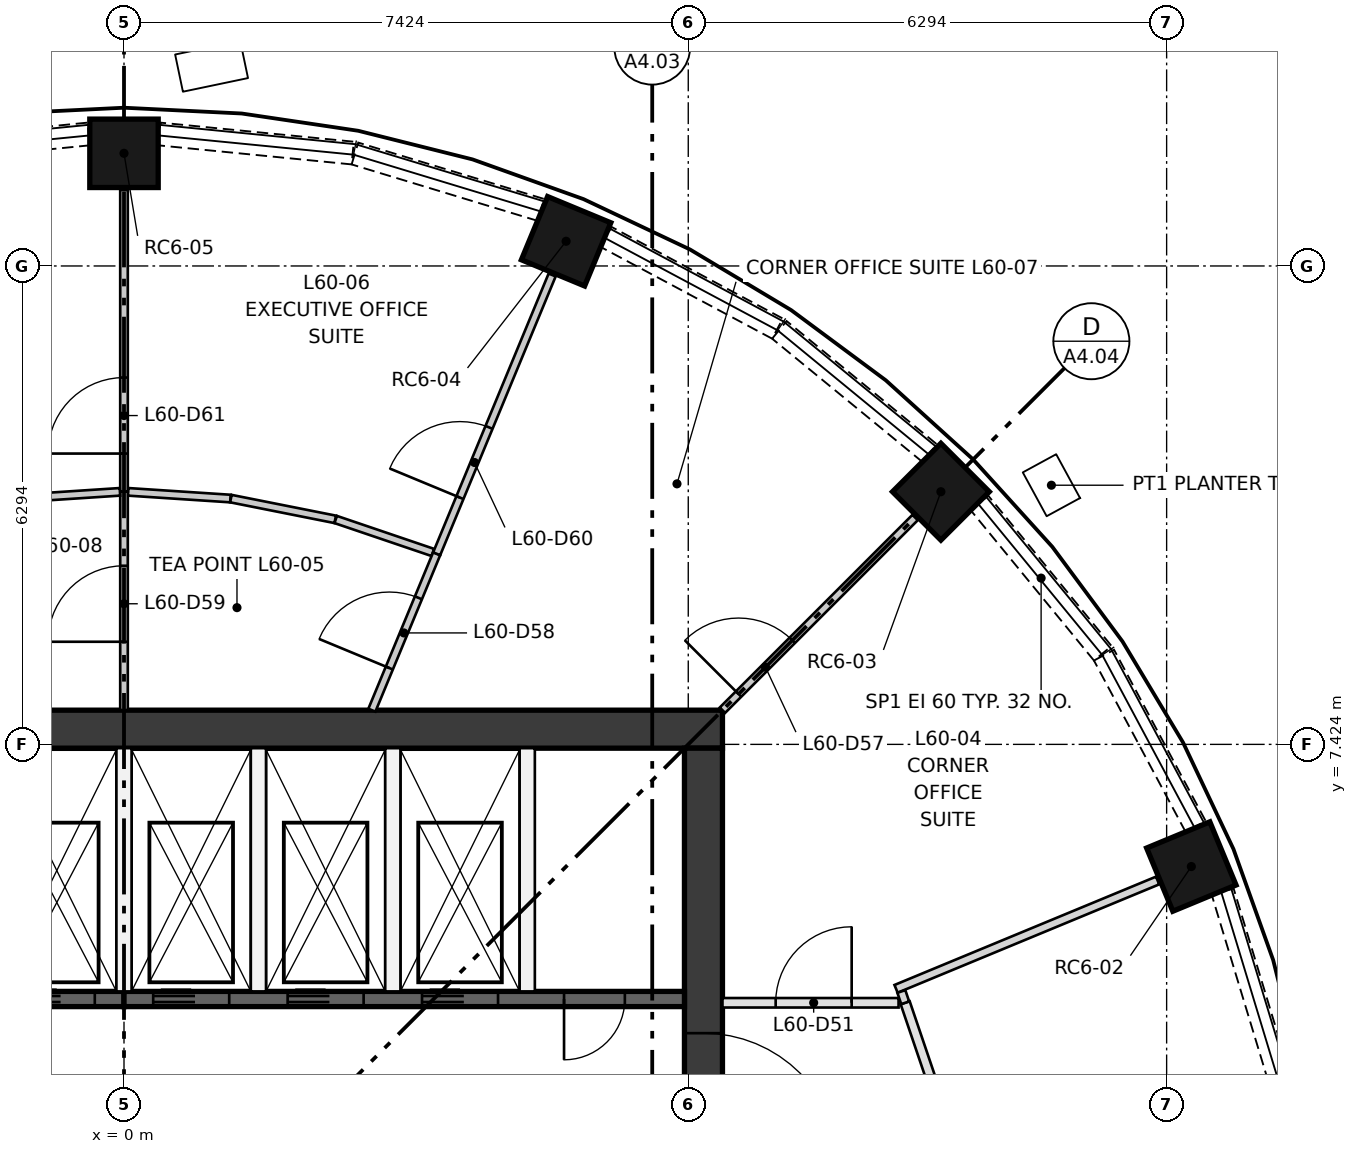
"""IFC4 building model, lengths in metres.
Left out: names, types, materials, properties, quantities, classifications, styles, units other than length and angle.
Written with IfcOpenShell. Run it as: python <this file> out.ifc"""

import sys

from ifc_helpers import new_model, si_unit, direction, frame, frame_2d, origin, origin_2d, place, context, subcontext, project, spatial, rectangle, extrude, element, fill, save


model = new_model("IFC4")
c1 = context("Model", 3, precision=1e-05, world=origin(), true_north=direction((0.0, 1.0)))
c2 = subcontext(c1, "Body", "Model", "MODEL_VIEW")
j1 = project(units=[si_unit("LENGTHUNIT", "METRE"), si_unit("PLANEANGLEUNIT", "RADIAN")], contexts=[c1])
p1 = place(None, origin())
s1 = spatial("IfcSite", under=j1, at=p1, CompositionType="ELEMENT")
p2 = place(p1, origin())
s2 = spatial("IfcBuilding", under=s1, at=p2, CompositionType="ELEMENT")
p3 = place(p2, frame((0.0, 0.0, 221.15)))
s3 = spatial("IfcBuildingStorey", under=s2, at=p3, CompositionType="ELEMENT", Elevation=221.15)
for number, where, z_axis, x_axis in (
    (1, (14.043, 5.817, 0.0), (0.0, 0.0, 1.0), (0.924, 0.383, 0.0)),
    (2, (10.748, 10.748, 0.0), (0.0, 0.0, 1.0), (0.707, 0.707, 0.0)),
    (3, (5.817, 14.043, 0.0), (0.0, 0.0, 1.0), (0.383, 0.924, 0.0)),
    (4, (0.0, 15.2, 0.0), (0.0, 0.0, 1.0), (0.0, 1.0, 0.0)),
):
    element("IfcColumn", number, at=place(p3, frame(where, z_axis=z_axis, x_axis=x_axis)), inside=s3, PredefinedType="COLUMN", context=c2, shape_type="SweptSolid", body=[
        extrude(rectangle(XDim=0.9, YDim=0.9, at=origin_2d()), origin(), (0.0, 0.0, 1.0), 2.85),
    ])
p4 = place(p3, frame((-7.874, 7.624, 0.0), z_axis=(0.0, 0.0, 1.0), x_axis=(1.0, 0.0, 0.0)))
e5 = element("IfcWall", 5, at=p4, inside=s3, PredefinedType="SHEAR", context=c2, shape_type="SweptSolid", body=[
    extrude(rectangle(XDim=15.748, YDim=0.5, at=frame_2d((7.874, 0.0))), origin(), (0.0, 0.0, 1.0), 3.35),
])
p5 = place(p3, frame((7.624, -7.374, 0.0), z_axis=(0.0, 0.0, 1.0), x_axis=(0.0, 1.0, 0.0)))
e6 = element("IfcWall", 6, at=p5, inside=s3, PredefinedType="SHEAR", context=c2, shape_type="SweptSolid", body=[
    extrude(rectangle(XDim=14.748, YDim=0.5, at=frame_2d((7.374, 0.0))), origin(), (0.0, 0.0, 1.0), 3.35),
])
p6 = place(p5, frame((6.874, 0.0, 0.0)))
e7 = element("IfcOpeningElement", 7, at=p6, cuts=e6, PredefinedType="OPENING", context=c2, shape_type="SweptSolid", body=[
    extrude(rectangle(XDim=1.0, YDim=2.1, at=frame_2d((0.5, 1.05))), frame((0.0, 0.26, 0.0), z_axis=(0.0, -1.0, 0.0), x_axis=(1.0, 0.0, 0.0)), (0.0, 0.0, 1.0), 0.52),
])
p7 = place(p5, frame((3.75, 0.0, 0.0)))
e8 = element("IfcOpeningElement", 8, at=p7, cuts=e6, PredefinedType="OPENING", context=c2, shape_type="SweptSolid", body=[
    extrude(rectangle(XDim=1.8, YDim=2.1, at=frame_2d((0.9, 1.05))), frame((0.0, 0.26, 0.0), z_axis=(0.0, -1.0, 0.0), x_axis=(1.0, 0.0, 0.0)), (0.0, 0.0, 1.0), 0.52),
])
p8 = place(p5, frame((9.198, 0.0, 0.0)))
e9 = element("IfcOpeningElement", 9, at=p8, cuts=e6, PredefinedType="OPENING", context=c2, shape_type="SweptSolid", body=[
    extrude(rectangle(XDim=1.8, YDim=2.1, at=frame_2d((0.9, 1.05))), frame((0.0, 0.26, 0.0), z_axis=(0.0, -1.0, 0.0), x_axis=(1.0, 0.0, 0.0)), (0.0, 0.0, 1.0), 0.52),
])
p9 = place(p3, frame((-7.374, 4.074, 0.0), z_axis=(0.0, 0.0, 1.0), x_axis=(1.0, 0.0, 0.0)))
e10 = element("IfcWall", 10, at=p9, inside=s3, PredefinedType="SHEAR", context=c2, shape_type="SweptSolid", body=[
    extrude(rectangle(XDim=7.374, YDim=0.2, at=frame_2d((3.687, 0.0))), origin(), (0.0, 0.0, 1.0), 3.0),
])
p10 = place(p9, frame((0.684, 0.0, 0.0)))
e11 = element("IfcOpeningElement", 11, at=p10, cuts=e10, PredefinedType="OPENING", context=c2, shape_type="SweptSolid", body=[
    extrude(rectangle(XDim=1.0, YDim=2.1, at=frame_2d((0.5, 1.05))), frame((0.0, 0.11, 0.0), z_axis=(0.0, -1.0, 0.0), x_axis=(1.0, 0.0, 0.0)), (0.0, 0.0, 1.0), 0.22),
])
p11 = place(p9, frame((2.453, 0.0, 0.0)))
e12 = element("IfcOpeningElement", 12, at=p11, cuts=e10, PredefinedType="OPENING", context=c2, shape_type="SweptSolid", body=[
    extrude(rectangle(XDim=1.0, YDim=2.1, at=frame_2d((0.5, 1.05))), frame((0.0, 0.11, 0.0), z_axis=(0.0, -1.0, 0.0), x_axis=(1.0, 0.0, 0.0)), (0.0, 0.0, 1.0), 0.22),
])
p12 = place(p9, frame((4.221, 0.0, 0.0)))
e13 = element("IfcOpeningElement", 13, at=p12, cuts=e10, PredefinedType="OPENING", context=c2, shape_type="SweptSolid", body=[
    extrude(rectangle(XDim=1.0, YDim=2.1, at=frame_2d((0.5, 1.05))), frame((0.0, 0.11, 0.0), z_axis=(0.0, -1.0, 0.0), x_axis=(1.0, 0.0, 0.0)), (0.0, 0.0, 1.0), 0.22),
])
p13 = place(p9, frame((5.99, 0.0, 0.0)))
e14 = element("IfcOpeningElement", 14, at=p13, cuts=e10, PredefinedType="OPENING", context=c2, shape_type="SweptSolid", body=[
    extrude(rectangle(XDim=1.0, YDim=2.1, at=frame_2d((0.5, 1.05))), frame((0.0, 0.11, 0.0), z_axis=(0.0, -1.0, 0.0), x_axis=(1.0, 0.0, 0.0)), (0.0, 0.0, 1.0), 0.22),
])
p14 = place(p3, frame((0.0, 4.074, 0.0), z_axis=(0.0, 0.0, 1.0), x_axis=(1.0, 0.0, 0.0)))
e15 = element("IfcWall", 15, at=p14, inside=s3, PredefinedType="SHEAR", context=c2, shape_type="SweptSolid", body=[
    extrude(rectangle(XDim=7.374, YDim=0.2, at=frame_2d((3.687, 0.0))), origin(), (0.0, 0.0, 1.0), 3.0),
])
p15 = place(p14, frame((0.384, 0.0, 0.0)))
e16 = element("IfcOpeningElement", 16, at=p15, cuts=e15, PredefinedType="OPENING", context=c2, shape_type="SweptSolid", body=[
    extrude(rectangle(XDim=1.0, YDim=2.1, at=frame_2d((0.5, 1.05))), frame((0.0, 0.11, 0.0), z_axis=(0.0, -1.0, 0.0), x_axis=(1.0, 0.0, 0.0)), (0.0, 0.0, 1.0), 0.22),
])
p16 = place(p14, frame((2.153, 0.0, 0.0)))
e17 = element("IfcOpeningElement", 17, at=p16, cuts=e15, PredefinedType="OPENING", context=c2, shape_type="SweptSolid", body=[
    extrude(rectangle(XDim=1.0, YDim=2.1, at=frame_2d((0.5, 1.05))), frame((0.0, 0.11, 0.0), z_axis=(0.0, -1.0, 0.0), x_axis=(1.0, 0.0, 0.0)), (0.0, 0.0, 1.0), 0.22),
])
p17 = place(p14, frame((3.921, 0.0, 0.0)))
e18 = element("IfcOpeningElement", 18, at=p17, cuts=e15, PredefinedType="OPENING", context=c2, shape_type="SweptSolid", body=[
    extrude(rectangle(XDim=1.0, YDim=2.1, at=frame_2d((0.5, 1.05))), frame((0.0, 0.11, 0.0), z_axis=(0.0, -1.0, 0.0), x_axis=(1.0, 0.0, 0.0)), (0.0, 0.0, 1.0), 0.22),
])
p18 = place(p14, frame((5.79, 0.0, 0.0)))
e19 = element("IfcOpeningElement", 19, at=p18, cuts=e15, PredefinedType="OPENING", context=c2, shape_type="SweptSolid", body=[
    extrude(rectangle(XDim=0.8, YDim=2.1, at=frame_2d((0.4, 1.05))), frame((0.0, 0.11, 0.0), z_axis=(0.0, -1.0, 0.0), x_axis=(1.0, 0.0, 0.0)), (0.0, 0.0, 1.0), 0.22),
])
for number, where, z_axis, x_axis in (
    (20, (0.0, 4.174, 0.0), (0.0, 0.0, 1.0), (0.0, 1.0, 0.0)),
    (21, (1.769, 4.174, 0.0), (0.0, 0.0, 1.0), (0.0, 1.0, 0.0)),
    (22, (3.537, 4.174, 0.0), (0.0, 0.0, 1.0), (0.0, 1.0, 0.0)),
    (23, (5.305, 4.174, 0.0), (0.0, 0.0, 1.0), (0.0, 1.0, 0.0)),
):
    element("IfcWall", number, at=place(p3, frame(where, z_axis=z_axis, x_axis=x_axis)), inside=s3, PredefinedType="PARTITIONING", context=c2, shape_type="SweptSolid", body=[
        extrude(rectangle(XDim=3.2, YDim=0.2, at=frame_2d((1.6, 0.0))), origin(), (0.0, 0.0, 1.0), 3.0),
    ])
p19 = place(p3, frame((15.198, 3.038, 0.0), z_axis=(0.0, 0.0, 1.0), x_axis=(-0.290219358397, 0.956960147557, 0.0)))
e24 = element("IfcWall", 24, at=p19, inside=s3, PredefinedType="SOLIDWALL", context=c2, shape_type="SweptSolid", body=[
    extrude(rectangle(XDim=2.557, YDim=0.3, at=frame_2d((1.279, 0.0))), origin(), (0.0, 0.0, 1.0), 0.9),
])
p20 = place(p3, frame((14.1, 6.343, 0.0), z_axis=(0.0, 0.0, 1.0), x_axis=(-0.471603904468, 0.881810499649, 0.0)))
e25 = element("IfcWall", 25, at=p20, inside=s3, PredefinedType="SOLIDWALL", context=c2, shape_type="SweptSolid", body=[
    extrude(rectangle(XDim=2.557, YDim=0.3, at=frame_2d((1.278, 0.0))), origin(), (0.0, 0.0, 1.0), 0.9),
])
for number, where, z_axis, x_axis in (
    (26, (12.877, 8.623, 0.0), (0.0, 0.0, 1.0), (-0.634, 0.773, 0.0)),
    (27, (10.6, 11.256, 0.0), (0.0, 0.0, 1.0), (-0.773, 0.634, 0.0)),
):
    element("IfcWall", number, at=place(p3, frame(where, z_axis=z_axis, x_axis=x_axis)), inside=s3, PredefinedType="SOLIDWALL", context=c2, shape_type="SweptSolid", body=[
        extrude(rectangle(XDim=2.558, YDim=0.3, at=frame_2d((1.279, 0.0))), origin(), (0.0, 0.0, 1.0), 0.9),
    ])
p21 = place(p3, frame((8.598, 12.894, 0.0), z_axis=(0.0, 0.0, 1.0), x_axis=(-0.881810499649, 0.471603904468, 0.0)))
e28 = element("IfcWall", 28, at=p21, inside=s3, PredefinedType="SOLIDWALL", context=c2, shape_type="SweptSolid", body=[
    extrude(rectangle(XDim=2.557, YDim=0.3, at=frame_2d((1.278, 0.0))), origin(), (0.0, 0.0, 1.0), 0.9),
])
p22 = place(p3, frame((5.486, 14.455, 0.0), z_axis=(0.0, 0.0, 1.0), x_axis=(-0.956960147557, 0.290219358397, 0.0)))
e29 = element("IfcWall", 29, at=p22, inside=s3, PredefinedType="SOLIDWALL", context=c2, shape_type="SweptSolid", body=[
    extrude(rectangle(XDim=2.557, YDim=0.3, at=frame_2d((1.279, 0.0))), origin(), (0.0, 0.0, 1.0), 0.9),
])
for number, where, z_axis, x_axis in (
    (30, (3.009, 15.204, 0.0), (0.0, 0.0, 1.0), (-0.995, 0.098, 0.0)),
    (31, (-0.464, 15.455, 0.0), (0.0, 0.0, 1.0), (-0.995, -0.098, 0.0)),
):
    element("IfcWall", number, at=place(p3, frame(where, z_axis=z_axis, x_axis=x_axis)), inside=s3, PredefinedType="SOLIDWALL", context=c2, shape_type="SweptSolid", body=[
        extrude(rectangle(XDim=2.558, YDim=0.3, at=frame_2d((1.279, 0.0))), origin(), (0.0, 0.0, 1.0), 0.9),
    ])
p23 = place(p3, frame((10.278, 4.024, 0.0), z_axis=(0.0, 0.0, 1.0), x_axis=(0.321363343769, -0.946955965862, 0.0)))
e32 = element("IfcWall", 32, at=p23, inside=s3, PredefinedType="PARTITIONING", context=c2, shape_type="SweptSolid", body=[
    extrude(rectangle(XDim=1.225, YDim=0.125, at=frame_2d((0.613, 0.0))), origin(), (0.0, 0.0, 1.0), 3.0),
])
p24 = place(p3, frame((7.874, 4.024, 0.0), z_axis=(0.0, 0.0, 1.0), x_axis=(1.0, 0.0, 0.0)))
e33 = element("IfcWall", 33, at=p24, inside=s3, PredefinedType="PARTITIONING", context=c2, shape_type="SweptSolid", body=[
    extrude(rectangle(XDim=2.317, YDim=0.125, at=frame_2d((1.158, 0.0))), origin(), (0.0, 0.0, 1.0), 3.0),
])
p25 = place(p24, frame((0.7, 0.0, 0.0)))
e34 = element("IfcOpeningElement", 34, at=p25, cuts=e33, PredefinedType="OPENING", context=c2, shape_type="SweptSolid", body=[
    extrude(rectangle(XDim=1.0, YDim=2.1, at=frame_2d((0.5, 1.05))), frame((0.0, 0.073, 0.0), z_axis=(0.0, -1.0, 0.0), x_axis=(1.0, 0.0, 0.0)), (0.0, 0.0, 1.0), 0.145),
])
p26 = place(p3, frame((10.158, 4.208, 0.0), z_axis=(0.0, 0.0, 1.0), x_axis=(0.923897012701, 0.382641228728, 0.0)))
e35 = element("IfcWall", 35, at=p26, inside=s3, PredefinedType="PARTITIONING", context=c2, shape_type="SweptSolid", body=[
    extrude(rectangle(XDim=3.725, YDim=0.11, at=frame_2d((1.862, 0.0))), origin(), (0.0, 0.0, 1.0), 3.0),
])
p27 = place(p3, frame((10.278, 4.024, 0.0), z_axis=(0.0, 0.0, 1.0), x_axis=(-0.321819116975, 0.94680117023, 0.0)))
e36 = element("IfcWall", 36, at=p27, inside=s3, PredefinedType="PARTITIONING", context=c2, shape_type="SweptSolid", body=[
    extrude(rectangle(XDim=0.157, YDim=0.11, at=frame_2d((0.079, 0.0))), origin(), (0.0, 0.0, 1.0), 3.0),
])
p28 = place(p3, frame((7.874, 7.874, 0.0), z_axis=(0.0, 0.0, 1.0), x_axis=(0.707106781187, 0.707106781187, 0.0)))
e37 = element("IfcWall", 37, at=p28, inside=s3, PredefinedType="PARTITIONING", context=c2, shape_type="SweptSolid", body=[
    extrude(rectangle(XDim=3.584, YDim=0.1, at=frame_2d((1.792, 0.0))), origin(), (0.0, 0.0, 1.0), 3.0),
])
p29 = place(p28, frame((0.3, 0.0, 0.0)))
e38 = element("IfcOpeningElement", 38, at=p29, cuts=e37, PredefinedType="OPENING", context=c2, shape_type="SweptSolid", body=[
    extrude(rectangle(XDim=1.0, YDim=2.1, at=frame_2d((0.5, 1.05))), frame((0.0, 0.06, 0.0), z_axis=(0.0, -1.0, 0.0), x_axis=(1.0, 0.0, 0.0)), (0.0, 0.0, 1.0), 0.12),
])
p30 = place(p3, frame((0.053, 10.747, 0.0), z_axis=(0.0, 0.0, 1.0), x_axis=(0.99785346224, -0.06548639473, 0.0)))
e39 = element("IfcWall", 39, at=p30, inside=s3, PredefinedType="PARTITIONING", context=c2, shape_type="SweptSolid", body=[
    extrude(rectangle(XDim=1.35, YDim=0.1, at=frame_2d((0.675, 0.0))), origin(), (0.0, 0.0, 1.0), 3.0),
])
p31 = place(p3, frame((1.406, 10.657, 0.0), z_axis=(0.0, 0.0, 1.0), x_axis=(0.980761417594, -0.19521025014, 0.0)))
e40 = element("IfcWall", 40, at=p31, inside=s3, PredefinedType="PARTITIONING", context=c2, shape_type="SweptSolid", body=[
    extrude(rectangle(XDim=1.399, YDim=0.1, at=frame_2d((0.7, 0.0))), origin(), (0.0, 0.0, 1.0), 3.0),
])
p32 = place(p3, frame((2.785, 10.383, 0.0), z_axis=(0.0, 0.0, 1.0), x_axis=(0.946968869726, -0.32132531766, 0.0)))
e41 = element("IfcWall", 41, at=p32, inside=s3, PredefinedType="PARTITIONING", context=c2, shape_type="SweptSolid", body=[
    extrude(rectangle(XDim=1.349, YDim=0.1, at=frame_2d((0.675, 0.0))), origin(), (0.0, 0.0, 1.0), 3.0),
])
p33 = place(p3, frame((3.261, 7.874, 0.0), z_axis=(0.0, 0.0, 1.0), x_axis=(0.382684189911, 0.923879218725, 0.0)))
e42 = element("IfcWall", 42, at=p33, inside=s3, PredefinedType="PARTITIONING", context=c2, shape_type="SweptSolid", body=[
    extrude(rectangle(XDim=2.227, YDim=0.1, at=frame_2d((1.114, 0.0))), origin(), (0.0, 0.0, 1.0), 3.0),
])
p34 = place(p33, frame((0.6, 0.0, 0.0)))
e43 = element("IfcOpeningElement", 43, at=p34, cuts=e42, PredefinedType="OPENING", context=c2, shape_type="SweptSolid", body=[
    extrude(rectangle(XDim=1.0, YDim=2.1, at=frame_2d((0.5, 1.05))), frame((0.0, 0.06, 0.0), z_axis=(0.0, -1.0, 0.0), x_axis=(1.0, 0.0, 0.0)), (0.0, 0.0, 1.0), 0.12),
])
p35 = place(p3, frame((0.0, 7.874, 0.0), z_axis=(0.0, 0.0, 1.0), x_axis=(0.0, 1.0, 0.0)))
e44 = element("IfcWall", 44, at=p35, inside=s3, PredefinedType="PARTITIONING", context=c2, shape_type="SweptSolid", body=[
    extrude(rectangle(XDim=2.876, YDim=0.1, at=frame_2d((1.438, 0.0))), origin(), (0.0, 0.0, 1.0), 3.0),
])
p36 = place(p35, frame((0.9, 0.0, 0.0)))
e45 = element("IfcOpeningElement", 45, at=p36, cuts=e44, PredefinedType="OPENING", context=c2, shape_type="SweptSolid", body=[
    extrude(rectangle(XDim=1.0, YDim=2.1, at=frame_2d((0.5, 1.05))), frame((0.0, 0.06, 0.0), z_axis=(0.0, -1.0, 0.0), x_axis=(1.0, 0.0, 0.0)), (0.0, 0.0, 1.0), 0.12),
])
p37 = place(p3, frame((4.114, 9.932, 0.0), z_axis=(0.0, 0.0, 1.0), x_axis=(0.382675844596, 0.923882675432, 0.0)))
e46 = element("IfcWall", 46, at=p37, inside=s3, PredefinedType="PARTITIONING", context=c2, shape_type="SweptSolid", body=[
    extrude(rectangle(XDim=3.97, YDim=0.1, at=frame_2d((1.985, 0.0))), origin(), (0.0, 0.0, 1.0), 3.0),
])
p38 = place(p37, frame((0.8, 0.0, 0.0)))
e47 = element("IfcOpeningElement", 47, at=p38, cuts=e46, PredefinedType="OPENING", context=c2, shape_type="SweptSolid", body=[
    extrude(rectangle(XDim=1.0, YDim=2.1, at=frame_2d((0.5, 1.05))), frame((0.0, 0.06, 0.0), z_axis=(0.0, -1.0, 0.0), x_axis=(1.0, 0.0, 0.0)), (0.0, 0.0, 1.0), 0.12),
])
p39 = place(p3, frame((0.0, 10.75, 0.0), z_axis=(0.0, 0.0, 1.0), x_axis=(0.0, 1.0, 0.0)))
e48 = element("IfcWall", 48, at=p39, inside=s3, PredefinedType="PARTITIONING", context=c2, shape_type="SweptSolid", body=[
    extrude(rectangle(XDim=3.97, YDim=0.1, at=frame_2d((1.985, 0.0))), origin(), (0.0, 0.0, 1.0), 3.0),
])
p40 = place(p39, frame((0.5, 0.0, 0.0)))
e49 = element("IfcOpeningElement", 49, at=p40, cuts=e48, PredefinedType="OPENING", context=c2, shape_type="SweptSolid", body=[
    extrude(rectangle(XDim=1.0, YDim=2.1, at=frame_2d((0.5, 1.05))), frame((0.0, 0.06, 0.0), z_axis=(0.0, -1.0, 0.0), x_axis=(1.0, 0.0, 0.0)), (0.0, 0.0, 1.0), 0.12),
])
p41 = place(p3, frame((-1.4, 10.658, 0.0), z_axis=(0.0, 0.0, 1.0), x_axis=(0.99785346224, 0.06548639473, 0.0)))
e50 = element("IfcWall", 50, at=p41, inside=s3, PredefinedType="PARTITIONING", context=c2, shape_type="SweptSolid", body=[
    extrude(rectangle(XDim=1.35, YDim=0.1, at=frame_2d((0.675, 0.0))), origin(), (0.0, 0.0, 1.0), 3.0),
])
p42 = place(p13, frame((1.0, 0.0, 0.0), z_axis=(0.0, 0.0, 1.0), x_axis=(-1.0, 0.0, 0.0)))
e51 = element("IfcDoor", 51, at=p42, inside=s3, OperationType="DOUBLE_DOOR_SLIDING", PredefinedType="DOOR", context=c2, shape_type="SweptSolid", body=[
    extrude(rectangle(XDim=1.0, YDim=2.1, at=frame_2d((0.5, 1.05))), frame((0.0, 0.025, 0.0), z_axis=(0.0, -1.0, 0.0), x_axis=(1.0, 0.0, 0.0)), (0.0, 0.0, 1.0), 0.05),
])
fill(e14, e51)
p43 = place(p15, frame((1.0, 0.0, 0.0), z_axis=(0.0, 0.0, 1.0), x_axis=(-1.0, 0.0, 0.0)))
e52 = element("IfcDoor", 52, at=p43, inside=s3, OperationType="DOUBLE_DOOR_SLIDING", PredefinedType="DOOR", context=c2, shape_type="SweptSolid", body=[
    extrude(rectangle(XDim=1.0, YDim=2.1, at=frame_2d((0.5, 1.05))), frame((0.0, 0.025, 0.0), z_axis=(0.0, -1.0, 0.0), x_axis=(1.0, 0.0, 0.0)), (0.0, 0.0, 1.0), 0.05),
])
fill(e16, e52)
p44 = place(p16, frame((1.0, 0.0, 0.0), z_axis=(0.0, 0.0, 1.0), x_axis=(-1.0, 0.0, 0.0)))
e53 = element("IfcDoor", 53, at=p44, inside=s3, OperationType="DOUBLE_DOOR_SLIDING", PredefinedType="DOOR", context=c2, shape_type="SweptSolid", body=[
    extrude(rectangle(XDim=1.0, YDim=2.1, at=frame_2d((0.5, 1.05))), frame((0.0, 0.025, 0.0), z_axis=(0.0, -1.0, 0.0), x_axis=(1.0, 0.0, 0.0)), (0.0, 0.0, 1.0), 0.05),
])
fill(e17, e53)
p45 = place(p17, frame((1.0, 0.0, 0.0), z_axis=(0.0, 0.0, 1.0), x_axis=(-1.0, 0.0, 0.0)))
e54 = element("IfcDoor", 54, at=p45, inside=s3, OperationType="DOUBLE_DOOR_SLIDING", PredefinedType="DOOR", context=c2, shape_type="SweptSolid", body=[
    extrude(rectangle(XDim=1.0, YDim=2.1, at=frame_2d((0.5, 1.05))), frame((0.0, 0.025, 0.0), z_axis=(0.0, -1.0, 0.0), x_axis=(1.0, 0.0, 0.0)), (0.0, 0.0, 1.0), 0.05),
])
fill(e18, e54)
p46 = place(p18, frame((0.8, 0.0, 0.0), z_axis=(0.0, 0.0, 1.0), x_axis=(-1.0, 0.0, 0.0)))
e55 = element("IfcDoor", 55, at=p46, inside=s3, OperationType="SINGLE_SWING_LEFT", PredefinedType="DOOR", context=c2, shape_type="SweptSolid", body=[
    extrude(rectangle(XDim=0.8, YDim=2.1, at=frame_2d((0.4, 1.05))), frame((0.0, 0.025, 0.0), z_axis=(0.0, -1.0, 0.0), x_axis=(1.0, 0.0, 0.0)), (0.0, 0.0, 1.0), 0.05),
])
fill(e19, e55)
p47 = place(p8, frame((1.8, 0.0, 0.0), z_axis=(0.0, 0.0, 1.0), x_axis=(-1.0, 0.0, 0.0)))
e56 = element("IfcDoor", 56, at=p47, inside=s3, OperationType="DOUBLE_DOOR_SINGLE_SWING", PredefinedType="DOOR", context=c2, shape_type="SweptSolid", body=[
    extrude(rectangle(XDim=1.8, YDim=2.1, at=frame_2d((0.9, 1.05))), frame((0.0, 0.025, 0.0), z_axis=(0.0, -1.0, 0.0), x_axis=(1.0, 0.0, 0.0)), (0.0, 0.0, 1.0), 0.05),
])
fill(e9, e56)
p48 = place(p25, origin())
e57 = element("IfcDoor", 57, at=p48, inside=s3, OperationType="SINGLE_SWING_RIGHT", PredefinedType="DOOR", context=c2, shape_type="SweptSolid", body=[
    extrude(rectangle(XDim=1.0, YDim=2.1, at=frame_2d((0.5, 1.05))), frame((0.0, 0.025, 0.0), z_axis=(0.0, -1.0, 0.0), x_axis=(1.0, 0.0, 0.0)), (0.0, 0.0, 1.0), 0.05),
])
fill(e34, e57)
p49 = place(p29, origin())
e58 = element("IfcDoor", 58, at=p49, inside=s3, OperationType="SINGLE_SWING_LEFT", PredefinedType="DOOR", context=c2, shape_type="SweptSolid", body=[
    extrude(rectangle(XDim=1.0, YDim=2.1, at=frame_2d((0.5, 1.05))), frame((0.0, 0.025, 0.0), z_axis=(0.0, -1.0, 0.0), x_axis=(1.0, 0.0, 0.0)), (0.0, 0.0, 1.0), 0.05),
])
fill(e38, e58)
p50 = place(p34, origin())
e59 = element("IfcDoor", 59, at=p50, inside=s3, OperationType="SINGLE_SWING_LEFT", PredefinedType="DOOR", context=c2, shape_type="SweptSolid", body=[
    extrude(rectangle(XDim=1.0, YDim=2.1, at=frame_2d((0.5, 1.05))), frame((0.0, 0.025, 0.0), z_axis=(0.0, -1.0, 0.0), x_axis=(1.0, 0.0, 0.0)), (0.0, 0.0, 1.0), 0.05),
])
fill(e43, e59)
p51 = place(p36, origin())
e60 = element("IfcDoor", 60, at=p51, inside=s3, OperationType="SINGLE_SWING_LEFT", PredefinedType="DOOR", context=c2, shape_type="SweptSolid", body=[
    extrude(rectangle(XDim=1.0, YDim=2.1, at=frame_2d((0.5, 1.05))), frame((0.0, 0.025, 0.0), z_axis=(0.0, -1.0, 0.0), x_axis=(1.0, 0.0, 0.0)), (0.0, 0.0, 1.0), 0.05),
])
fill(e45, e60)
p52 = place(p38, origin())
e61 = element("IfcDoor", 61, at=p52, inside=s3, OperationType="SINGLE_SWING_LEFT", PredefinedType="DOOR", context=c2, shape_type="SweptSolid", body=[
    extrude(rectangle(XDim=1.0, YDim=2.1, at=frame_2d((0.5, 1.05))), frame((0.0, 0.025, 0.0), z_axis=(0.0, -1.0, 0.0), x_axis=(1.0, 0.0, 0.0)), (0.0, 0.0, 1.0), 0.05),
])
fill(e47, e61)
p53 = place(p40, origin())
e62 = element("IfcDoor", 62, at=p53, inside=s3, OperationType="SINGLE_SWING_LEFT", PredefinedType="DOOR", context=c2, shape_type="SweptSolid", body=[
    extrude(rectangle(XDim=1.0, YDim=2.1, at=frame_2d((0.5, 1.05))), frame((0.0, 0.025, 0.0), z_axis=(0.0, -1.0, 0.0), x_axis=(1.0, 0.0, 0.0)), (0.0, 0.0, 1.0), 0.05),
])
fill(e49, e62)
save(model, sys.argv[1])
